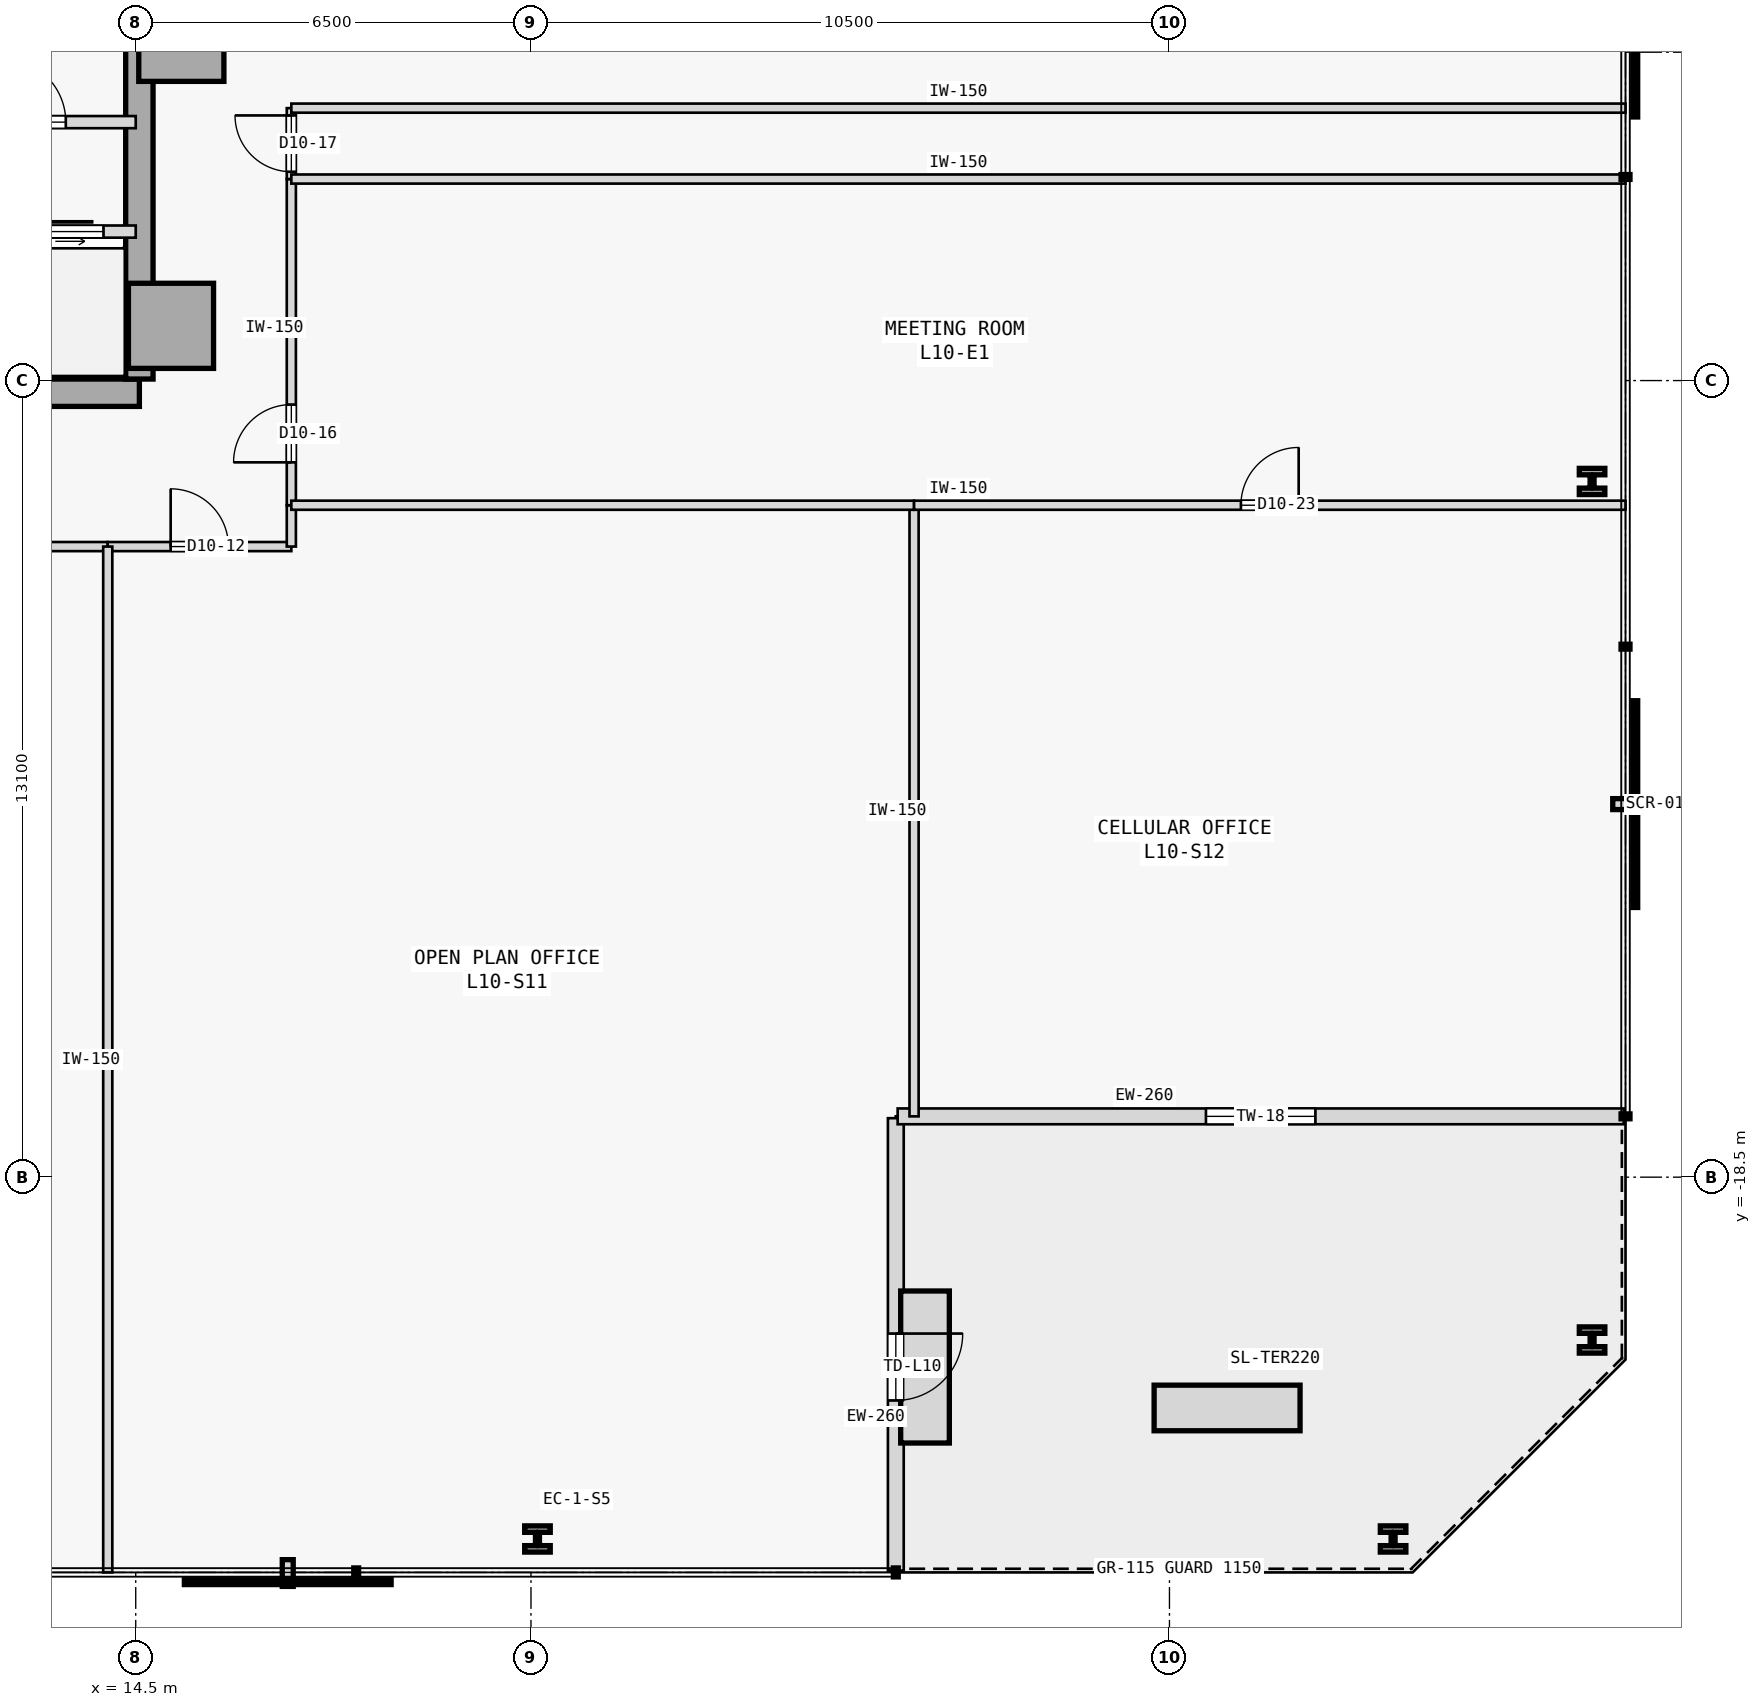
"""IFC4 building model, lengths in metres.
Left out: names, types, materials, properties, quantities, classifications, styles, units other than length and angle.
Written with IfcOpenShell. Run it as: python <this file> out.ifc"""

import sys

from ifc_helpers import new_model, si_unit, direction, frame, frame_2d, origin, origin_2d, place, context, subcontext, project, spatial, rectangle, i_section, extrude, element, fill, save


model = new_model("IFC4")
c1 = context("Model", 3, precision=1e-05, world=origin(), true_north=direction((0.0, 1.0)))
c2 = subcontext(c1, "Body", "Model", "MODEL_VIEW")
j1 = project(units=[si_unit("LENGTHUNIT", "METRE"), si_unit("PLANEANGLEUNIT", "RADIAN")], contexts=[c1])
p1 = place(None, origin())
s1 = spatial("IfcSite", under=j1, at=p1, CompositionType="ELEMENT")
p2 = place(p1, origin())
s2 = spatial("IfcBuilding", under=s1, at=p2, CompositionType="ELEMENT")
p3 = place(p2, frame((0.0, 0.0, 44.6)))
s3 = spatial("IfcBuildingStorey", under=s2, at=p3, CompositionType="ELEMENT", Elevation=44.6)
for number, where, z_axis, x_axis in (
    (1, (15.25, 0.22, 0.0), (0.0, 0.0, 1.0), (1.0, 0.0, 0.0)),
    (2, (15.08, -4.5, 0.0), (0.0, 0.0, 1.0), (1.0, 0.0, 0.0)),
):
    element("IfcColumn", number, at=place(p3, frame(where, z_axis=z_axis, x_axis=x_axis)), inside=s3, PredefinedType="COLUMN", context=c2, shape_type="SweptSolid", body=[
        extrude(rectangle(XDim=1.4, YDim=1.4, at=origin_2d()), origin(), (0.0, 0.0, 1.0), 3.8),
    ])
p4 = place(p3, frame((3.7, -5.6, 0.0), z_axis=(0.0, 0.0, 1.0), x_axis=(1.0, 0.0, 0.0)))
e3 = element("IfcWall", 3, at=p4, inside=s3, PredefinedType="SHEAR", context=c2, shape_type="SweptSolid", body=[
    extrude(rectangle(XDim=10.86, YDim=0.45, at=frame_2d((5.43, 0.0))), origin(), (0.0, 0.0, 1.0), 3.575),
])
p5 = place(p3, frame((14.56, -5.375, 0.0), z_axis=(0.0, 0.0, 1.0), x_axis=(0.0, 1.0, 0.0)))
e4 = element("IfcWall", 4, at=p5, inside=s3, PredefinedType="SHEAR", context=c2, shape_type="SweptSolid", body=[
    extrude(rectangle(XDim=10.75, YDim=0.45, at=frame_2d((5.375, 0.0))), origin(), (0.0, 0.0, 1.0), 3.575),
])
for number, where, z_axis, x_axis in (
    (5, (21.107, -24.45, 0.0), (0.0, 0.0, 1.0), (1.0, 0.0, 0.0)),
    (6, (35.178, -24.45, 0.0), (0.0, 0.0, 1.0), (1.0, 0.0, 0.0)),
    (7, (38.45, -21.178, 0.0), (0.0, 0.0, 1.0), (1.0, 0.0, 0.0)),
    (8, (38.45, -7.059, 0.0), (0.0, 0.0, 1.0), (1.0, 0.0, 0.0)),
):
    element("IfcColumn", number, at=place(p3, frame(where, z_axis=z_axis, x_axis=x_axis)), inside=s3, PredefinedType="COLUMN", context=c2, shape_type="SweptSolid", body=[
        extrude(i_section(OverallWidth=0.42, OverallDepth=0.431, WebThickness=0.065, FlangeThickness=0.106, FilletRadius=0.015, at=origin_2d()), origin(), (0.0, 0.0, 1.0), 3.8),
    ])
p6 = place(p3, frame((27.0, -24.97, 0.0), z_axis=(0.0, 0.0, 1.0), x_axis=(0.0, 1.0, 0.0)))
e9 = element("IfcWall", 9, at=p6, inside=s3, PredefinedType="STANDARD", context=c2, shape_type="SweptSolid", body=[
    extrude(rectangle(XDim=7.44, YDim=0.26, at=frame_2d((3.72, 0.0))), origin(), (0.0, 0.0, 1.0), 3.575),
])
p7 = place(p6, frame((2.798, 0.0, 0.0)))
e10 = element("IfcOpeningElement", 10, at=p7, cuts=e9, PredefinedType="OPENING", context=c2, shape_type="SweptSolid", body=[
    extrude(rectangle(XDim=1.1, YDim=2.2, at=frame_2d((0.55, 1.1))), frame((0.0, 0.14, 0.0), z_axis=(0.0, -1.0, 0.0), x_axis=(1.0, 0.0, 0.0)), (0.0, 0.0, 1.0), 0.28),
])
p8 = place(p3, frame((27.03, -17.5, 0.0), z_axis=(0.0, 0.0, 1.0), x_axis=(1.0, 0.0, 0.0)))
e11 = element("IfcWall", 11, at=p8, inside=s3, PredefinedType="STANDARD", context=c2, shape_type="SweptSolid", body=[
    extrude(rectangle(XDim=11.94, YDim=0.26, at=frame_2d((5.97, 0.0))), origin(), (0.0, 0.0, 1.0), 3.575),
])
p9 = place(p8, frame((5.07, 0.0, 0.8)))
e12 = element("IfcOpeningElement", 12, at=p9, cuts=e11, PredefinedType="OPENING", context=c2, shape_type="SweptSolid", body=[
    extrude(rectangle(XDim=1.8, YDim=1.8, at=frame_2d((0.9, 0.9))), frame((0.0, 0.14, 0.0), z_axis=(0.0, -1.0, 0.0), x_axis=(1.0, 0.0, 0.0)), (0.0, 0.0, 1.0), 0.28),
])
p10 = place(p3, frame((11.55, -1.15, 0.0), z_axis=(0.0, 0.0, 1.0), x_axis=(1.0, 0.0, 0.0)))
e13 = element("IfcWall", 13, at=p10, inside=s3, PredefinedType="STANDARD", context=c2, shape_type="SweptSolid", body=[
    extrude(rectangle(XDim=2.95, YDim=0.2, at=frame_2d((1.475, 0.0))), origin(), (0.0, 0.0, 1.0), 3.575),
])
p11 = place(p10, frame((0.75, 0.0, 0.0)))
e14 = element("IfcOpeningElement", 14, at=p11, cuts=e13, PredefinedType="OPENING", context=c2, shape_type="SweptSolid", body=[
    extrude(rectangle(XDim=1.05, YDim=2.18, at=frame_2d((0.525, 1.09))), frame((0.0, 0.11, 0.0), z_axis=(0.0, -1.0, 0.0), x_axis=(1.0, 0.0, 0.0)), (0.0, 0.0, 1.0), 0.22),
])
p12 = place(p3, frame((3.7, -2.95, 0.0), z_axis=(0.0, 0.0, 1.0), x_axis=(1.0, 0.0, 0.0)))
e15 = element("IfcWall", 15, at=p12, inside=s3, PredefinedType="STANDARD", context=c2, shape_type="SweptSolid", body=[
    extrude(rectangle(XDim=10.8, YDim=0.2, at=frame_2d((5.4, 0.0))), origin(), (0.0, 0.0, 1.0), 3.575),
])
p13 = place(p12, frame((7.01, 0.0, 0.0)))
e16 = element("IfcOpeningElement", 16, at=p13, cuts=e15, PredefinedType="OPENING", context=c2, shape_type="SweptSolid", body=[
    extrude(rectangle(XDim=1.1, YDim=2.15, at=frame_2d((0.55, 1.075))), frame((0.0, 0.11, 0.0), z_axis=(0.0, -1.0, 0.0), x_axis=(1.0, 0.0, 0.0)), (0.0, 0.0, 1.0), 0.22),
])
p14 = place(p12, frame((9.17, 0.0, 0.0)))
e17 = element("IfcOpeningElement", 17, at=p14, cuts=e15, PredefinedType="OPENING", context=c2, shape_type="SweptSolid", body=[
    extrude(rectangle(XDim=1.1, YDim=2.15, at=frame_2d((0.55, 1.075))), frame((0.0, 0.11, 0.0), z_axis=(0.0, -1.0, 0.0), x_axis=(1.0, 0.0, 0.0)), (0.0, 0.0, 1.0), 0.22),
])
p15 = place(p3, frame((0.92, -8.13, 0.0), z_axis=(0.0, 0.0, 1.0), x_axis=(1.0, 0.0, 0.0)))
e18 = element("IfcWall", 18, at=p15, inside=s3, PredefinedType="PARTITIONING", context=c2, shape_type="SweptSolid", body=[
    extrude(rectangle(XDim=13.12, YDim=0.15, at=frame_2d((6.56, 0.0))), origin(), (0.0, 0.0, 1.0), 3.575),
])
p16 = place(p3, frame((14.04, -8.13, 0.0), z_axis=(0.0, 0.0, 1.0), x_axis=(1.0, 0.0, 0.0)))
e19 = element("IfcWall", 19, at=p16, inside=s3, PredefinedType="PARTITIONING", context=c2, shape_type="SweptSolid", body=[
    extrude(rectangle(XDim=3.019, YDim=0.15, at=frame_2d((1.51, 0.0))), origin(), (0.0, 0.0, 1.0), 3.575),
])
p17 = place(p16, frame((1.034, 0.0, 0.0)))
e20 = element("IfcOpeningElement", 20, at=p17, cuts=e19, PredefinedType="OPENING", context=c2, shape_type="SweptSolid", body=[
    extrude(rectangle(XDim=0.95, YDim=2.15, at=frame_2d((0.475, 1.075))), frame((0.0, 0.085, 0.0), z_axis=(0.0, -1.0, 0.0), x_axis=(1.0, 0.0, 0.0)), (0.0, 0.0, 1.0), 0.17),
])
p18 = place(p3, frame((17.059, -8.13, 0.0), z_axis=(0.0, 0.0, 1.0), x_axis=(0.0, 1.0, 0.0)))
e21 = element("IfcWall", 21, at=p18, inside=s3, PredefinedType="PARTITIONING", context=c2, shape_type="SweptSolid", body=[
    extrude(rectangle(XDim=0.68, YDim=0.15, at=frame_2d((0.34, 0.0))), origin(), (0.0, 0.0, 1.0), 3.575),
])
p19 = place(p3, frame((17.059, -7.45, 0.0), z_axis=(0.0, 0.0, 1.0), x_axis=(0.0, 1.0, 0.0)))
e22 = element("IfcWall", 22, at=p19, inside=s3, PredefinedType="PARTITIONING", context=c2, shape_type="SweptSolid", body=[
    extrude(rectangle(XDim=5.364, YDim=0.15, at=frame_2d((2.682, 0.0))), origin(), (0.0, 0.0, 1.0), 3.575),
])
p20 = place(p19, frame((0.705, 0.0, 0.0)))
e23 = element("IfcOpeningElement", 23, at=p20, cuts=e22, PredefinedType="OPENING", context=c2, shape_type="SweptSolid", body=[
    extrude(rectangle(XDim=0.95, YDim=2.15, at=frame_2d((0.475, 1.075))), frame((0.0, 0.085, 0.0), z_axis=(0.0, -1.0, 0.0), x_axis=(1.0, 0.0, 0.0)), (0.0, 0.0, 1.0), 0.17),
])
p21 = place(p3, frame((17.059, -2.086, 0.0), z_axis=(0.0, 0.0, 1.0), x_axis=(0.0, 1.0, 0.0)))
e24 = element("IfcWall", 24, at=p21, inside=s3, PredefinedType="PARTITIONING", context=c2, shape_type="SweptSolid", body=[
    extrude(rectangle(XDim=1.166, YDim=0.15, at=frame_2d((0.583, 0.0))), origin(), (0.0, 0.0, 1.0), 3.575),
])
p22 = place(p21, frame((0.12, 0.0, 0.0)))
e25 = element("IfcOpeningElement", 25, at=p22, cuts=e24, PredefinedType="OPENING", context=c2, shape_type="SweptSolid", body=[
    extrude(rectangle(XDim=0.926, YDim=2.15, at=frame_2d((0.463, 1.075))), frame((0.0, 0.085, 0.0), z_axis=(0.0, -1.0, 0.0), x_axis=(1.0, 0.0, 0.0)), (0.0, 0.0, 1.0), 0.17),
])
p23 = place(p3, frame((17.059, -0.92, 0.0), z_axis=(0.0, 0.0, 1.0), x_axis=(1.0, 0.0, 0.0)))
e26 = element("IfcWall", 26, at=p23, inside=s3, PredefinedType="PARTITIONING", context=c2, shape_type="SweptSolid", body=[
    extrude(rectangle(XDim=21.941, YDim=0.15, at=frame_2d((10.97, 0.0))), origin(), (0.0, 0.0, 1.0), 3.575),
])
p24 = place(p3, frame((14.04, -25.0, 0.0), z_axis=(0.0, 0.0, 1.0), x_axis=(0.0, 1.0, 0.0)))
e27 = element("IfcWall", 27, at=p24, inside=s3, PredefinedType="PARTITIONING", context=c2, shape_type="SweptSolid", body=[
    extrude(rectangle(XDim=16.87, YDim=0.15, at=frame_2d((8.435, 0.0))), origin(), (0.0, 0.0, 1.0), 3.575),
])
p25 = place(p3, frame((27.3, -17.5, 0.0), z_axis=(0.0, 0.0, 1.0), x_axis=(0.0, 1.0, 0.0)))
e28 = element("IfcWall", 28, at=p25, inside=s3, PredefinedType="PARTITIONING", context=c2, shape_type="SweptSolid", body=[
    extrude(rectangle(XDim=10.05, YDim=0.15, at=frame_2d((5.025, 0.0))), origin(), (0.0, 0.0, 1.0), 3.575),
])
p26 = place(p3, frame((17.059, -7.45, 0.0), z_axis=(0.0, 0.0, 1.0), x_axis=(1.0, 0.0, 0.0)))
e29 = element("IfcWall", 29, at=p26, inside=s3, PredefinedType="PARTITIONING", context=c2, shape_type="SweptSolid", body=[
    extrude(rectangle(XDim=10.241, YDim=0.15, at=frame_2d((5.121, 0.0))), origin(), (0.0, 0.0, 1.0), 3.575),
])
p27 = place(p3, frame((27.3, -7.45, 0.0), z_axis=(0.0, 0.0, 1.0), x_axis=(1.0, 0.0, 0.0)))
e30 = element("IfcWall", 30, at=p27, inside=s3, PredefinedType="PARTITIONING", context=c2, shape_type="SweptSolid", body=[
    extrude(rectangle(XDim=11.7, YDim=0.15, at=frame_2d((5.85, 0.0))), origin(), (0.0, 0.0, 1.0), 3.575),
])
p28 = place(p27, frame((5.375, 0.0, 0.0)))
e31 = element("IfcOpeningElement", 31, at=p28, cuts=e30, PredefinedType="OPENING", context=c2, shape_type="SweptSolid", body=[
    extrude(rectangle(XDim=0.95, YDim=2.15, at=frame_2d((0.475, 1.075))), frame((0.0, 0.085, 0.0), z_axis=(0.0, -1.0, 0.0), x_axis=(1.0, 0.0, 0.0)), (0.0, 0.0, 1.0), 0.17),
])
p29 = place(p3, frame((17.059, -2.086, 0.0), z_axis=(0.0, 0.0, 1.0), x_axis=(1.0, 0.0, 0.0)))
e32 = element("IfcWall", 32, at=p29, inside=s3, PredefinedType="PARTITIONING", context=c2, shape_type="SweptSolid", body=[
    extrude(rectangle(XDim=21.941, YDim=0.15, at=frame_2d((10.97, 0.0))), origin(), (0.0, 0.0, 1.0), 3.575),
])
p30 = place(p7, frame((1.1, 0.0, 0.0), z_axis=(0.0, 0.0, 1.0), x_axis=(-1.0, 0.0, 0.0)))
e33 = element("IfcDoor", 33, at=p30, inside=s3, OperationType="SINGLE_SWING_RIGHT", PredefinedType="DOOR", context=c2, shape_type="SweptSolid", body=[
    extrude(rectangle(XDim=1.1, YDim=2.2, at=frame_2d((0.55, 1.1))), frame((0.0, 0.025, 0.0), z_axis=(0.0, -1.0, 0.0), x_axis=(1.0, 0.0, 0.0)), (0.0, 0.0, 1.0), 0.05),
])
fill(e10, e33)
p31 = place(p9, origin())
e34 = element("IfcWindow", 34, at=p31, inside=s3, PartitioningType="SINGLE_PANEL", PredefinedType="WINDOW", context=c2, shape_type="SweptSolid", body=[
    extrude(rectangle(XDim=1.8, YDim=1.8, at=frame_2d((0.9, 0.9))), frame((0.0, 0.03, 0.0), z_axis=(0.0, -1.0, 0.0), x_axis=(1.0, 0.0, 0.0)), (0.0, 0.0, 1.0), 0.06),
])
fill(e12, e34)
p32 = place(p11, origin())
e35 = element("IfcDoor", 35, at=p32, inside=s3, OperationType="SINGLE_SWING_LEFT", PredefinedType="DOOR", context=c2, shape_type="SweptSolid", body=[
    extrude(rectangle(XDim=1.05, YDim=2.18, at=frame_2d((0.525, 1.09))), frame((0.0, 0.025, 0.0), z_axis=(0.0, -1.0, 0.0), x_axis=(1.0, 0.0, 0.0)), (0.0, 0.0, 1.0), 0.05),
])
fill(e14, e35)
p33 = place(p14, origin())
e36 = element("IfcDoor", 36, at=p33, inside=s3, OperationType="SLIDING_TO_LEFT", PredefinedType="DOOR", context=c2, shape_type="SweptSolid", body=[
    extrude(rectangle(XDim=1.1, YDim=2.15, at=frame_2d((0.55, 1.075))), frame((0.0, 0.025, 0.0), z_axis=(0.0, -1.0, 0.0), x_axis=(1.0, 0.0, 0.0)), (0.0, 0.0, 1.0), 0.05),
])
fill(e17, e36)
p34 = place(p17, origin())
e37 = element("IfcDoor", 37, at=p34, inside=s3, OperationType="SINGLE_SWING_LEFT", PredefinedType="DOOR", context=c2, shape_type="SweptSolid", body=[
    extrude(rectangle(XDim=0.95, YDim=2.15, at=frame_2d((0.475, 1.075))), frame((0.0, 0.025, 0.0), z_axis=(0.0, -1.0, 0.0), x_axis=(1.0, 0.0, 0.0)), (0.0, 0.0, 1.0), 0.05),
])
fill(e20, e37)
p35 = place(p20, origin())
e38 = element("IfcDoor", 38, at=p35, inside=s3, OperationType="SINGLE_SWING_LEFT", PredefinedType="DOOR", context=c2, shape_type="SweptSolid", body=[
    extrude(rectangle(XDim=0.95, YDim=2.15, at=frame_2d((0.475, 1.075))), frame((0.0, 0.025, 0.0), z_axis=(0.0, -1.0, 0.0), x_axis=(1.0, 0.0, 0.0)), (0.0, 0.0, 1.0), 0.05),
])
fill(e23, e38)
p36 = place(p22, origin())
e39 = element("IfcDoor", 39, at=p36, inside=s3, OperationType="SINGLE_SWING_RIGHT", PredefinedType="DOOR", context=c2, shape_type="SweptSolid", body=[
    extrude(rectangle(XDim=0.926, YDim=2.15, at=frame_2d((0.463, 1.075))), frame((0.0, 0.025, 0.0), z_axis=(0.0, -1.0, 0.0), x_axis=(1.0, 0.0, 0.0)), (0.0, 0.0, 1.0), 0.05),
])
fill(e25, e39)
p37 = place(p28, origin())
e40 = element("IfcDoor", 40, at=p37, inside=s3, OperationType="SINGLE_SWING_RIGHT", PredefinedType="DOOR", context=c2, shape_type="SweptSolid", body=[
    extrude(rectangle(XDim=0.95, YDim=2.15, at=frame_2d((0.475, 1.075))), frame((0.0, 0.025, 0.0), z_axis=(0.0, -1.0, 0.0), x_axis=(1.0, 0.0, 0.0)), (0.0, 0.0, 1.0), 0.05),
])
fill(e31, e40)
save(model, sys.argv[1])
